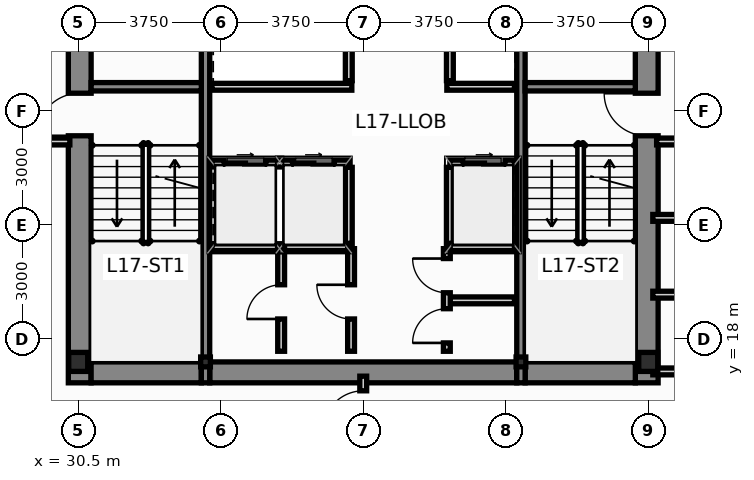
"""IFC4 building model, lengths in metres.
Left out: names, types, materials, properties, quantities, classifications, styles, units other than length and angle.
Written with IfcOpenShell. Run it as: python <this file> out.ifc"""

import sys

from ifc_helpers import new_model, si_unit, direction, frame, frame_2d, origin, origin_2d, place, context, subcontext, project, spatial, rectangle, i_section, extrude, source, transform, mapped, element, fill, save


model = new_model("IFC4")
c1 = context("Model", 3, precision=1e-05, world=origin(), true_north=direction((0.0, 1.0)))
c2 = subcontext(c1, "Body", "Model", "MODEL_VIEW")
j1 = project(units=[si_unit("LENGTHUNIT", "METRE"), si_unit("PLANEANGLEUNIT", "RADIAN")], contexts=[c1])
p1 = place(None, origin())
s1 = spatial("IfcSite", under=j1, at=p1, CompositionType="ELEMENT")
p2 = place(p1, origin())
s2 = spatial("IfcBuilding", under=s1, at=p2, CompositionType="ELEMENT")
p3 = place(p2, frame((0.0, 0.0, 67.75)))
s3 = spatial("IfcBuildingStorey", under=s2, at=p3, CompositionType="ELEMENT", Elevation=67.75)
m1 = source(origin(), c2, "Body", "SweptSolid", [
    extrude(i_section(OverallWidth=0.5, OverallDepth=0.5, WebThickness=0.028, FlangeThickness=0.04, at=origin_2d()), origin(), (0.0, 0.0, 1.0), 3.65),
])
for number, where, z_axis, x_axis in (
    (1, (30.5, 17.4, 0.0), (0.0, 0.0, 1.0), (1.0, 0.0, 0.0)),
    (2, (45.5, 17.4, 0.0), (0.0, 0.0, 1.0), (1.0, 0.0, 0.0)),
):
    element("IfcColumn", number, at=place(p3, frame(where, z_axis=z_axis, x_axis=x_axis)), inside=s3, PredefinedType="COLUMN", context=c2, shape_type="MappedRepresentation", body=[
        mapped(m1, transform((0.0, 0.0, 0.0), scale=1.0)),
    ])
m2 = source(origin(), c2, "Body", "SweptSolid", [
    extrude(i_section(OverallWidth=0.256, OverallDepth=0.26, WebThickness=0.01, FlangeThickness=0.017, at=origin_2d()), origin(), (0.0, 0.0, 1.0), 3.65),
])
for number, where, z_axis, x_axis in (
    (3, (33.85, 17.4, 0.0), (0.0, 0.0, 1.0), (1.0, 0.0, 0.0)),
    (4, (42.15, 17.4, 0.0), (0.0, 0.0, 1.0), (1.0, 0.0, 0.0)),
):
    element("IfcColumn", number, at=place(p3, frame(where, z_axis=z_axis, x_axis=x_axis)), inside=s3, PredefinedType="COLUMN", context=c2, shape_type="MappedRepresentation", body=[
        mapped(m2, transform((0.0, 0.0, 0.0), scale=1.0)),
    ])
p4 = place(p3, frame((30.54, 16.85, 0.0), z_axis=(0.0, 0.0, 1.0), x_axis=(0.0, 1.0, 0.0)))
e5 = element("IfcWall", 5, at=p4, inside=s3, PredefinedType="SHEAR", context=c2, shape_type="SweptSolid", body=[
    extrude(rectangle(XDim=13.425, YDim=0.6, at=frame_2d((6.712, 0.0))), origin(), (0.0, 0.0, 1.0), 3.65),
])
p5 = place(p4, frame((6.5, 0.0, 0.0)))
e6 = element("IfcOpeningElement", 6, at=p5, cuts=e5, PredefinedType="OPENING", context=c2, shape_type="SweptSolid", body=[
    extrude(rectangle(XDim=1.12, YDim=2.15, at=frame_2d((0.56, 1.075))), frame((0.0, 0.312, 0.0), z_axis=(0.0, -1.0, 0.0), x_axis=(1.0, 0.0, 0.0)), (0.0, 0.0, 1.0), 0.624),
])
p6 = place(p4, frame((10.95, 0.0, 0.0)))
e7 = element("IfcOpeningElement", 7, at=p6, cuts=e5, PredefinedType="OPENING", context=c2, shape_type="SweptSolid", body=[
    extrude(rectangle(XDim=1.2, YDim=2.2, at=frame_2d((0.6, 1.1))), frame((0.0, 0.312, 0.0), z_axis=(0.0, -1.0, 0.0), x_axis=(1.0, 0.0, 0.0)), (0.0, 0.0, 1.0), 0.624),
])
p7 = place(p3, frame((45.46, 16.85, 0.0), z_axis=(0.0, 0.0, 1.0), x_axis=(0.0, 1.0, 0.0)))
e8 = element("IfcWall", 8, at=p7, inside=s3, PredefinedType="SHEAR", context=c2, shape_type="SweptSolid", body=[
    extrude(rectangle(XDim=13.425, YDim=0.6, at=frame_2d((6.712, 0.0))), origin(), (0.0, 0.0, 1.0), 3.65),
])
p8 = place(p7, frame((6.5, 0.0, 0.0)))
e9 = element("IfcOpeningElement", 9, at=p8, cuts=e8, PredefinedType="OPENING", context=c2, shape_type="SweptSolid", body=[
    extrude(rectangle(XDim=1.12, YDim=2.15, at=frame_2d((0.56, 1.075))), frame((0.0, 0.312, 0.0), z_axis=(0.0, -1.0, 0.0), x_axis=(1.0, 0.0, 0.0)), (0.0, 0.0, 1.0), 0.624),
])
p9 = place(p7, frame((10.95, 0.0, 0.0)))
e10 = element("IfcOpeningElement", 10, at=p9, cuts=e8, PredefinedType="OPENING", context=c2, shape_type="SweptSolid", body=[
    extrude(rectangle(XDim=1.2, YDim=2.2, at=frame_2d((0.6, 1.1))), frame((0.0, 0.312, 0.0), z_axis=(0.0, -1.0, 0.0), x_axis=(1.0, 0.0, 0.0)), (0.0, 0.0, 1.0), 0.624),
])
p10 = place(p3, frame((30.84, 17.125, 0.0), z_axis=(0.0, 0.0, 1.0), x_axis=(1.0, 0.0, 0.0)))
e11 = element("IfcWall", 11, at=p10, inside=s3, PredefinedType="SHEAR", context=c2, shape_type="SweptSolid", body=[
    extrude(rectangle(XDim=2.9, YDim=0.55, at=frame_2d((1.45, 0.0))), origin(), (0.0, 0.0, 1.0), 3.65),
])
p11 = place(p3, frame((33.96, 17.125, 0.0), z_axis=(0.0, 0.0, 1.0), x_axis=(1.0, 0.0, 0.0)))
e12 = element("IfcWall", 12, at=p11, inside=s3, PredefinedType="SHEAR", context=c2, shape_type="SweptSolid", body=[
    extrude(rectangle(XDim=8.08, YDim=0.55, at=frame_2d((4.04, 0.0))), origin(), (0.0, 0.0, 1.0), 3.65),
])
p12 = place(p3, frame((42.26, 17.125, 0.0), z_axis=(0.0, 0.0, 1.0), x_axis=(1.0, 0.0, 0.0)))
e13 = element("IfcWall", 13, at=p12, inside=s3, PredefinedType="SHEAR", context=c2, shape_type="SweptSolid", body=[
    extrude(rectangle(XDim=2.9, YDim=0.55, at=frame_2d((1.45, 0.0))), origin(), (0.0, 0.0, 1.0), 3.65),
])
for number, where, z_axis, x_axis in (
    (14, (33.85, 16.85, 0.0), (0.0, 0.0, 1.0), (0.0, 1.0, 0.0)),
    (15, (42.15, 16.85, 0.0), (0.0, 0.0, 1.0), (0.0, 1.0, 0.0)),
):
    element("IfcWall", number, at=place(p3, frame(where, z_axis=z_axis, x_axis=x_axis)), inside=s3, PredefinedType="SHEAR", context=c2, shape_type="SweptSolid", body=[
        extrude(rectangle(XDim=13.425, YDim=0.22, at=frame_2d((6.712, 0.0))), origin(), (0.0, 0.0, 1.0), 3.65),
    ])
for number, where, z_axis, x_axis in (
    (16, (30.84, 24.64, 0.0), (0.0, 0.0, 1.0), (1.0, 0.0, 0.0)),
    (17, (42.26, 24.64, 0.0), (0.0, 0.0, 1.0), (1.0, 0.0, 0.0)),
):
    element("IfcWall", number, at=place(p3, frame(where, z_axis=z_axis, x_axis=x_axis)), inside=s3, PredefinedType="SHEAR", context=c2, shape_type="SweptSolid", body=[
        extrude(rectangle(XDim=2.9, YDim=0.22, at=frame_2d((1.45, 0.0))), origin(), (0.0, 0.0, 1.0), 3.65),
    ])
p13 = place(p3, frame((34.02, 22.62, 0.0), z_axis=(0.0, 0.0, 1.0), x_axis=(1.0, 0.0, 0.0)))
e18 = element("IfcWall", 18, at=p13, inside=s3, PredefinedType="PARTITIONING", context=c2, shape_type="SweptSolid", body=[
    extrude(rectangle(XDim=3.6, YDim=0.18, at=frame_2d((1.8, 0.0))), origin(), (0.0, 0.0, 1.0), 3.4),
])
p14 = place(p13, frame((0.32, 0.0, 0.0)))
e19 = element("IfcOpeningElement", 19, at=p14, cuts=e18, PredefinedType="OPENING", context=c2, shape_type="SweptSolid", body=[
    extrude(rectangle(XDim=1.1, YDim=2.2, at=frame_2d((0.55, 1.1))), frame((0.0, 0.102, 0.0), z_axis=(0.0, -1.0, 0.0), x_axis=(1.0, 0.0, 0.0)), (0.0, 0.0, 1.0), 0.204),
])
p15 = place(p13, frame((2.12, 0.0, 0.0)))
e20 = element("IfcOpeningElement", 20, at=p15, cuts=e18, PredefinedType="OPENING", context=c2, shape_type="SweptSolid", body=[
    extrude(rectangle(XDim=1.1, YDim=2.2, at=frame_2d((0.55, 1.1))), frame((0.0, 0.102, 0.0), z_axis=(0.0, -1.0, 0.0), x_axis=(1.0, 0.0, 0.0)), (0.0, 0.0, 1.0), 0.204),
])
p16 = place(p3, frame((40.28, 22.62, 0.0), z_axis=(0.0, 0.0, 1.0), x_axis=(1.0, 0.0, 0.0)))
e21 = element("IfcWall", 21, at=p16, inside=s3, PredefinedType="PARTITIONING", context=c2, shape_type="SweptSolid", body=[
    extrude(rectangle(XDim=1.7, YDim=0.18, at=frame_2d((0.85, 0.0))), origin(), (0.0, 0.0, 1.0), 3.4),
])
p17 = place(p16, frame((0.35, 0.0, 0.0)))
e22 = element("IfcOpeningElement", 22, at=p17, cuts=e21, PredefinedType="OPENING", context=c2, shape_type="SweptSolid", body=[
    extrude(rectangle(XDim=1.1, YDim=2.2, at=frame_2d((0.55, 1.1))), frame((0.0, 0.102, 0.0), z_axis=(0.0, -1.0, 0.0), x_axis=(1.0, 0.0, 0.0)), (0.0, 0.0, 1.0), 0.204),
])
for number, where, z_axis, x_axis in (
    (23, (37.62, 20.52, 0.0), (0.0, 0.0, 1.0), (0.0, 1.0, 0.0)),
    (24, (40.28, 20.52, 0.0), (0.0, 0.0, 1.0), (0.0, 1.0, 0.0)),
    (25, (37.62, 24.8, 0.0), (0.0, 0.0, 1.0), (0.0, 1.0, 0.0)),
    (26, (40.28, 24.8, 0.0), (0.0, 0.0, 1.0), (0.0, 1.0, 0.0)),
):
    element("IfcWall", number, at=place(p3, frame(where, z_axis=z_axis, x_axis=x_axis)), inside=s3, PredefinedType="PARTITIONING", context=c2, shape_type="SweptSolid", body=[
        extrude(rectangle(XDim=2.0, YDim=0.18, at=frame_2d((1.0, 0.0))), origin(), (0.0, 0.0, 1.0), 3.4),
    ])
p18 = place(p3, frame((34.02, 24.64, 0.0), z_axis=(0.0, 0.0, 1.0), x_axis=(1.0, 0.0, 0.0)))
e27 = element("IfcWall", 27, at=p18, inside=s3, PredefinedType="PARTITIONING", context=c2, shape_type="SweptSolid", body=[
    extrude(rectangle(XDim=3.68, YDim=0.18, at=frame_2d((1.84, 0.0))), origin(), (0.0, 0.0, 1.0), 3.4),
])
p19 = place(p3, frame((40.2, 24.64, 0.0), z_axis=(0.0, 0.0, 1.0), x_axis=(1.0, 0.0, 0.0)))
e28 = element("IfcWall", 28, at=p19, inside=s3, PredefinedType="PARTITIONING", context=c2, shape_type="SweptSolid", body=[
    extrude(rectangle(XDim=1.78, YDim=0.18, at=frame_2d((0.89, 0.0))), origin(), (0.0, 0.0, 1.0), 3.4),
])
for number, where, z_axis, x_axis in (
    (29, (27.52, 23.2, 0.0), (0.0, 0.0, 1.0), (1.0, 0.0, 0.0)),
    (30, (45.72, 23.2, 0.0), (0.0, 0.0, 1.0), (1.0, 0.0, 0.0)),
):
    element("IfcWall", number, at=place(p3, frame(where, z_axis=z_axis, x_axis=x_axis)), inside=s3, PredefinedType="PARTITIONING", context=c2, shape_type="SweptSolid", body=[
        extrude(rectangle(XDim=2.76, YDim=0.18, at=frame_2d((1.38, 0.0))), origin(), (0.0, 0.0, 1.0), 3.4),
    ])
p20 = place(p3, frame((34.02, 20.42, 0.0), z_axis=(0.0, 0.0, 1.0), x_axis=(1.0, 0.0, 0.0)))
e31 = element("IfcWall", 31, at=p20, inside=s3, PredefinedType="PARTITIONING", context=c2, shape_type="SweptSolid", body=[
    extrude(rectangle(XDim=3.64, YDim=0.18, at=frame_2d((1.82, 0.0))), origin(), (0.0, 0.0, 1.0), 3.4),
])
p21 = place(p3, frame((40.22, 20.42, 0.0), z_axis=(0.0, 0.0, 1.0), x_axis=(1.0, 0.0, 0.0)))
e32 = element("IfcWall", 32, at=p21, inside=s3, PredefinedType="PARTITIONING", context=c2, shape_type="SweptSolid", body=[
    extrude(rectangle(XDim=1.76, YDim=0.18, at=frame_2d((0.88, 0.0))), origin(), (0.0, 0.0, 1.0), 3.4),
])
p22 = place(p3, frame((35.84, 17.68, 0.0), z_axis=(0.0, 0.0, 1.0), x_axis=(0.0, 1.0, 0.0)))
e33 = element("IfcWall", 33, at=p22, inside=s3, PredefinedType="PARTITIONING", context=c2, shape_type="SweptSolid", body=[
    extrude(rectangle(XDim=2.7, YDim=0.18, at=frame_2d((1.35, 0.0))), origin(), (0.0, 0.0, 1.0), 3.4),
])
p23 = place(p22, frame((0.85, 0.0, 0.0)))
e34 = element("IfcOpeningElement", 34, at=p23, cuts=e33, PredefinedType="OPENING", context=c2, shape_type="SweptSolid", body=[
    extrude(rectangle(XDim=0.9, YDim=2.1, at=frame_2d((0.45, 1.05))), frame((0.0, 0.102, 0.0), z_axis=(0.0, -1.0, 0.0), x_axis=(1.0, 0.0, 0.0)), (0.0, 0.0, 1.0), 0.204),
])
p24 = place(p3, frame((37.68, 17.68, 0.0), z_axis=(0.0, 0.0, 1.0), x_axis=(0.0, 1.0, 0.0)))
e35 = element("IfcWall", 35, at=p24, inside=s3, PredefinedType="PARTITIONING", context=c2, shape_type="SweptSolid", body=[
    extrude(rectangle(XDim=2.7, YDim=0.18, at=frame_2d((1.35, 0.0))), origin(), (0.0, 0.0, 1.0), 3.4),
])
p25 = place(p24, frame((0.85, 0.0, 0.0)))
e36 = element("IfcOpeningElement", 36, at=p25, cuts=e35, PredefinedType="OPENING", context=c2, shape_type="SweptSolid", body=[
    extrude(rectangle(XDim=0.9, YDim=2.1, at=frame_2d((0.45, 1.05))), frame((0.0, 0.102, 0.0), z_axis=(0.0, -1.0, 0.0), x_axis=(1.0, 0.0, 0.0)), (0.0, 0.0, 1.0), 0.204),
])
p26 = place(p3, frame((40.28, 19.02, 0.0), z_axis=(0.0, 0.0, 1.0), x_axis=(1.0, 0.0, 0.0)))
e37 = element("IfcWall", 37, at=p26, inside=s3, PredefinedType="PARTITIONING", context=c2, shape_type="SweptSolid", body=[
    extrude(rectangle(XDim=1.7, YDim=0.18, at=frame_2d((0.85, 0.0))), origin(), (0.0, 0.0, 1.0), 3.4),
])
p27 = place(p3, frame((40.2, 17.68, 0.0), z_axis=(0.0, 0.0, 1.0), x_axis=(0.0, 1.0, 0.0)))
e38 = element("IfcWall", 38, at=p27, inside=s3, PredefinedType="PARTITIONING", context=c2, shape_type="SweptSolid", body=[
    extrude(rectangle(XDim=2.7, YDim=0.18, at=frame_2d((1.35, 0.0))), origin(), (0.0, 0.0, 1.0), 3.4),
])
p28 = place(p27, frame((0.22, 0.0, 0.0)))
e39 = element("IfcOpeningElement", 39, at=p28, cuts=e38, PredefinedType="OPENING", context=c2, shape_type="SweptSolid", body=[
    extrude(rectangle(XDim=0.9, YDim=2.1, at=frame_2d((0.45, 1.05))), frame((0.0, 0.102, 0.0), z_axis=(0.0, -1.0, 0.0), x_axis=(1.0, 0.0, 0.0)), (0.0, 0.0, 1.0), 0.204),
])
p29 = place(p27, frame((1.54, 0.0, 0.0)))
e40 = element("IfcOpeningElement", 40, at=p29, cuts=e38, PredefinedType="OPENING", context=c2, shape_type="SweptSolid", body=[
    extrude(rectangle(XDim=0.9, YDim=2.1, at=frame_2d((0.45, 1.05))), frame((0.0, 0.102, 0.0), z_axis=(0.0, -1.0, 0.0), x_axis=(1.0, 0.0, 0.0)), (0.0, 0.0, 1.0), 0.204),
])
for number, where, z_axis, x_axis in (
    (41, (45.62, 19.17, 0.0), (0.0, 0.0, 1.0), (1.0, 0.0, 0.0)),
    (42, (45.62, 21.19, 0.0), (0.0, 0.0, 1.0), (1.0, 0.0, 0.0)),
):
    element("IfcWall", number, at=place(p3, frame(where, z_axis=z_axis, x_axis=x_axis)), inside=s3, PredefinedType="PARTITIONING", context=c2, shape_type="SweptSolid", body=[
        extrude(rectangle(XDim=2.9, YDim=0.18, at=frame_2d((1.45, 0.0))), origin(), (0.0, 0.0, 1.0), 3.4),
    ])
p30 = place(p3, frame((45.62, 17.15, 0.0), z_axis=(0.0, 0.0, 1.0), x_axis=(1.0, 0.0, 0.0)))
e43 = element("IfcWall", 43, at=p30, inside=s3, PredefinedType="PARTITIONING", context=c2, shape_type="SweptSolid", body=[
    extrude(rectangle(XDim=2.9, YDim=0.18, at=frame_2d((1.45, 0.0))), origin(), (0.0, 0.0, 1.0), 2.783),
])
p31 = place(p3, frame((38.0, 15.205, 0.0), z_axis=(0.0, 0.0, 1.0), x_axis=(0.0, 1.0, 0.0)))
e44 = element("IfcWall", 44, at=p31, inside=s3, PredefinedType="PARTITIONING", context=c2, shape_type="SweptSolid", body=[
    extrude(rectangle(XDim=1.82, YDim=0.18, at=frame_2d((0.91, 0.0))), origin(), (0.0, 0.0, 1.0), 3.4),
])
p32 = place(p31, frame((0.385, 0.0, 0.0)))
e45 = element("IfcOpeningElement", 45, at=p32, cuts=e44, PredefinedType="OPENING", context=c2, shape_type="SweptSolid", body=[
    extrude(rectangle(XDim=1.05, YDim=2.15, at=frame_2d((0.525, 1.075))), frame((0.0, 0.102, 0.0), z_axis=(0.0, -1.0, 0.0), x_axis=(1.0, 0.0, 0.0)), (0.0, 0.0, 1.0), 0.204),
])
p33 = place(p5, origin())
e46 = element("IfcDoor", 46, at=p33, inside=s3, OperationType="SINGLE_SWING_LEFT", PredefinedType="DOOR", context=c2, shape_type="SweptSolid", body=[
    extrude(rectangle(XDim=1.12, YDim=2.15, at=frame_2d((0.56, 1.075))), frame((0.0, 0.025, 0.0), z_axis=(0.0, -1.0, 0.0), x_axis=(1.0, 0.0, 0.0)), (0.0, 0.0, 1.0), 0.05),
])
fill(e6, e46)
p34 = place(p8, origin())
e47 = element("IfcDoor", 47, at=p34, inside=s3, OperationType="SINGLE_SWING_RIGHT", PredefinedType="DOOR", context=c2, shape_type="SweptSolid", body=[
    extrude(rectangle(XDim=1.12, YDim=2.15, at=frame_2d((0.56, 1.075))), frame((0.0, 0.025, 0.0), z_axis=(0.0, -1.0, 0.0), x_axis=(1.0, 0.0, 0.0)), (0.0, 0.0, 1.0), 0.05),
])
fill(e9, e47)
p35 = place(p14, origin())
e48 = element("IfcDoor", 48, at=p35, inside=s3, OperationType="SLIDING_TO_LEFT", PredefinedType="DOOR", context=c2, shape_type="SweptSolid", body=[
    extrude(rectangle(XDim=1.1, YDim=2.2, at=frame_2d((0.55, 1.1))), frame((0.0, 0.025, 0.0), z_axis=(0.0, -1.0, 0.0), x_axis=(1.0, 0.0, 0.0)), (0.0, 0.0, 1.0), 0.05),
])
fill(e19, e48)
p36 = place(p15, origin())
e49 = element("IfcDoor", 49, at=p36, inside=s3, OperationType="SLIDING_TO_RIGHT", PredefinedType="DOOR", context=c2, shape_type="SweptSolid", body=[
    extrude(rectangle(XDim=1.1, YDim=2.2, at=frame_2d((0.55, 1.1))), frame((0.0, 0.025, 0.0), z_axis=(0.0, -1.0, 0.0), x_axis=(1.0, 0.0, 0.0)), (0.0, 0.0, 1.0), 0.05),
])
fill(e20, e49)
p37 = place(p17, origin())
e50 = element("IfcDoor", 50, at=p37, inside=s3, OperationType="SLIDING_TO_LEFT", PredefinedType="DOOR", context=c2, shape_type="SweptSolid", body=[
    extrude(rectangle(XDim=1.1, YDim=2.2, at=frame_2d((0.55, 1.1))), frame((0.0, 0.025, 0.0), z_axis=(0.0, -1.0, 0.0), x_axis=(1.0, 0.0, 0.0)), (0.0, 0.0, 1.0), 0.05),
])
fill(e22, e50)
p38 = place(p23, origin())
e51 = element("IfcDoor", 51, at=p38, inside=s3, OperationType="SINGLE_SWING_LEFT", PredefinedType="DOOR", context=c2, shape_type="SweptSolid", body=[
    extrude(rectangle(XDim=0.9, YDim=2.1, at=frame_2d((0.45, 1.05))), frame((0.0, 0.025, 0.0), z_axis=(0.0, -1.0, 0.0), x_axis=(1.0, 0.0, 0.0)), (0.0, 0.0, 1.0), 0.05),
])
fill(e34, e51)
p39 = place(p25, origin())
e52 = element("IfcDoor", 52, at=p39, inside=s3, OperationType="SINGLE_SWING_RIGHT", PredefinedType="DOOR", context=c2, shape_type="SweptSolid", body=[
    extrude(rectangle(XDim=0.9, YDim=2.1, at=frame_2d((0.45, 1.05))), frame((0.0, 0.025, 0.0), z_axis=(0.0, -1.0, 0.0), x_axis=(1.0, 0.0, 0.0)), (0.0, 0.0, 1.0), 0.05),
])
fill(e36, e52)
p40 = place(p28, origin())
e53 = element("IfcDoor", 53, at=p40, inside=s3, OperationType="SINGLE_SWING_LEFT", PredefinedType="DOOR", context=c2, shape_type="SweptSolid", body=[
    extrude(rectangle(XDim=0.9, YDim=2.1, at=frame_2d((0.45, 1.05))), frame((0.0, 0.025, 0.0), z_axis=(0.0, -1.0, 0.0), x_axis=(1.0, 0.0, 0.0)), (0.0, 0.0, 1.0), 0.05),
])
fill(e39, e53)
p41 = place(p29, origin())
e54 = element("IfcDoor", 54, at=p41, inside=s3, OperationType="SINGLE_SWING_RIGHT", PredefinedType="DOOR", context=c2, shape_type="SweptSolid", body=[
    extrude(rectangle(XDim=0.9, YDim=2.1, at=frame_2d((0.45, 1.05))), frame((0.0, 0.025, 0.0), z_axis=(0.0, -1.0, 0.0), x_axis=(1.0, 0.0, 0.0)), (0.0, 0.0, 1.0), 0.05),
])
fill(e40, e54)
p42 = place(p32, origin())
e55 = element("IfcDoor", 55, at=p42, inside=s3, OperationType="SINGLE_SWING_LEFT", PredefinedType="DOOR", context=c2, shape_type="SweptSolid", body=[
    extrude(rectangle(XDim=1.05, YDim=2.15, at=frame_2d((0.525, 1.075))), frame((0.0, 0.025, 0.0), z_axis=(0.0, -1.0, 0.0), x_axis=(1.0, 0.0, 0.0)), (0.0, 0.0, 1.0), 0.05),
])
fill(e45, e55)
save(model, sys.argv[1])
